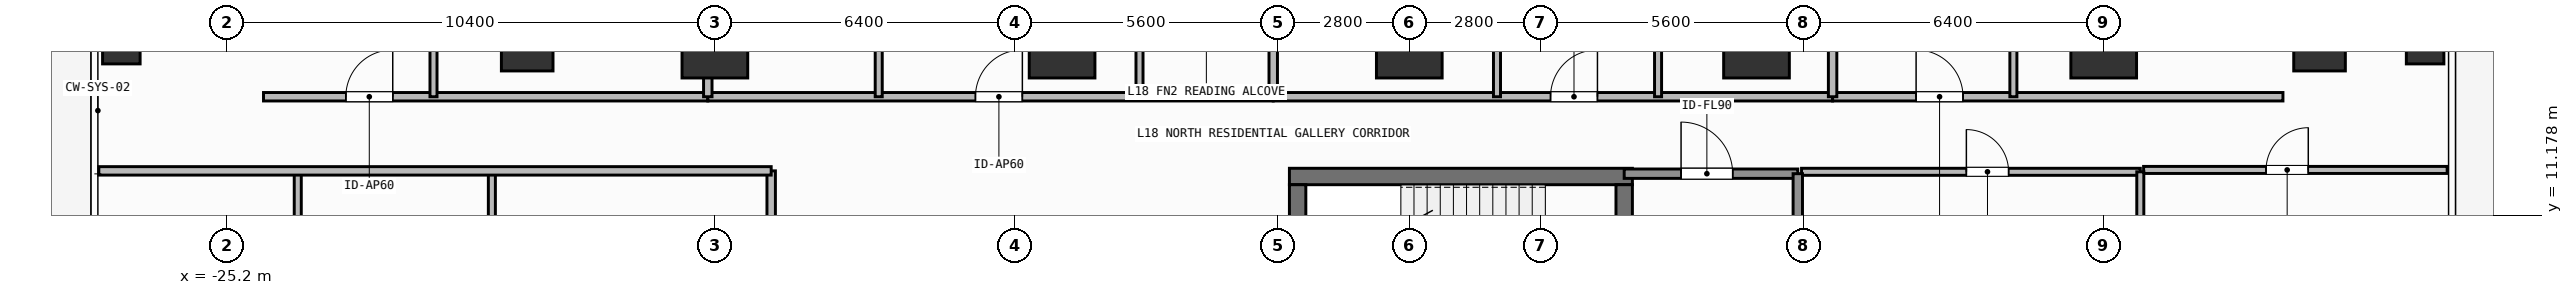
"""IFC4 building model, lengths in metres.
Left out: names, types, materials, properties, quantities, classifications, styles, units other than length and angle.
Written with IfcOpenShell. Run it as: python <this file> out.ifc"""

import sys

from ifc_helpers import new_model, si_unit, direction, frame, frame_2d, origin, origin_2d, place, context, subcontext, project, spatial, rectangle, hollow_rectangle, extrude, element, fill, save


model = new_model("IFC4")
c1 = context("Model", 3, precision=1e-05, world=origin(), true_north=direction((0.0, 1.0)))
c2 = subcontext(c1, "Body", "Model", "MODEL_VIEW")
j1 = project(units=[si_unit("LENGTHUNIT", "METRE"), si_unit("PLANEANGLEUNIT", "RADIAN")], contexts=[c1])
p1 = place(None, origin())
s1 = spatial("IfcSite", under=j1, at=p1, CompositionType="ELEMENT")
p2 = place(p1, origin())
s2 = spatial("IfcBuilding", under=s1, at=p2, CompositionType="ELEMENT")
p3 = place(p2, frame((0.0, 0.0, 69.6)))
s3 = spatial("IfcBuildingStorey", under=s2, at=p3, CompositionType="ELEMENT", Elevation=69.6)
p4 = place(p3, frame((-2.555, 12.0, 0.0), z_axis=(0.0, 0.0, 1.0), x_axis=(1.0, 0.0, 0.0)))
e1 = element("IfcWall", 1, at=p4, inside=s3, PredefinedType="SHEAR", context=c2, shape_type="SweptSolid", body=[
    extrude(rectangle(XDim=7.31, YDim=0.35, at=frame_2d((3.655, 0.0))), origin(), (0.0, 0.0, 1.0), 3.9),
])
p5 = place(p3, frame((-2.38, 8.9, 0.0), z_axis=(0.0, 0.0, 1.0), x_axis=(0.0, 1.0, 0.0)))
e2 = element("IfcWall", 2, at=p5, inside=s3, PredefinedType="SHEAR", context=c2, shape_type="SweptSolid", body=[
    extrude(rectangle(XDim=2.925, YDim=0.35, at=frame_2d((1.462, 0.0))), origin(), (0.0, 0.0, 1.0), 3.9),
])
p6 = place(p3, frame((4.58, 11.825, 0.0), z_axis=(0.0, 0.0, 1.0), x_axis=(0.0, -1.0, 0.0)))
e3 = element("IfcWall", 3, at=p6, inside=s3, PredefinedType="SHEAR", context=c2, shape_type="SweptSolid", body=[
    extrude(rectangle(XDim=2.925, YDim=0.35, at=frame_2d((1.462, 0.0))), origin(), (0.0, 0.0, 1.0), 3.9),
])
p7 = place(p6, frame((0.913, 0.0, 0.0)))
e4 = element("IfcOpeningElement", 4, at=p7, cuts=e3, PredefinedType="OPENING", context=c2, shape_type="SweptSolid", body=[
    extrude(rectangle(XDim=1.1, YDim=2.15, at=frame_2d((0.55, 1.075))), frame((0.0, 0.185, 0.0), z_axis=(0.0, -1.0, 0.0), x_axis=(1.0, 0.0, 0.0)), (0.0, 0.0, 1.0), 0.37),
])
for number, where, z_axis, x_axis in (
    (5, (-14.8, 14.8, 0.0), (0.0, 0.0, 1.0), (1.0, 0.0, 0.0)),
    (6, (-7.4, 14.8, 0.0), (0.0, 0.0, 1.0), (1.0, 0.0, 0.0)),
    (7, (0.0, 14.8, 0.0), (0.0, 0.0, 1.0), (1.0, 0.0, 0.0)),
    (8, (7.4, 14.8, 0.0), (0.0, 0.0, 1.0), (1.0, 0.0, 0.0)),
    (9, (14.8, 14.8, 0.0), (0.0, 0.0, 1.0), (1.0, 0.0, 0.0)),
):
    element("IfcColumn", number, at=place(p3, frame(where, z_axis=z_axis, x_axis=x_axis)), inside=s3, PredefinedType="COLUMN", context=c2, shape_type="SweptSolid", body=[
        extrude(rectangle(XDim=1.4, YDim=1.4, at=origin_2d()), origin(), (0.0, 0.0, 1.0), 3.9),
    ])
for number, where, z_axis, x_axis in (
    (10, (-18.8, 14.8, 0.0), (0.0, 0.0, 1.0), (1.0, 0.0, 0.0)),
    (11, (19.4, 14.8, 0.0), (0.0, 0.0, 1.0), (1.0, 0.0, 0.0)),
):
    element("IfcColumn", number, at=place(p3, frame(where, z_axis=z_axis, x_axis=x_axis)), inside=s3, PredefinedType="COLUMN", context=c2, shape_type="SweptSolid", body=[
        extrude(rectangle(XDim=1.1, YDim=1.1, at=origin_2d()), origin(), (0.0, 0.0, 1.0), 3.9),
    ])
for number, where, z_axis, x_axis in (
    (12, (-27.45, 14.8, 0.0), (0.0, 0.0, 1.0), (1.0, 0.0, 0.0)),
    (13, (21.65, 14.8, 0.0), (0.0, 0.0, 1.0), (1.0, 0.0, 0.0)),
):
    element("IfcColumn", number, at=place(p3, frame(where, z_axis=z_axis, x_axis=x_axis)), inside=s3, PredefinedType="COLUMN", context=c2, shape_type="SweptSolid", body=[
        extrude(hollow_rectangle(XDim=0.8, YDim=0.8, WallThickness=0.036, at=origin_2d()), origin(), (0.0, 0.0, 1.0), 3.9),
    ])
p8 = place(p3, frame((4.58, 12.06, 0.0), z_axis=(0.0, 0.0, 1.0), x_axis=(1.0, 0.0, 0.0)))
e14 = element("IfcWall", 14, at=p8, inside=s3, PredefinedType="SOLIDWALL", context=c2, shape_type="SweptSolid", body=[
    extrude(rectangle(XDim=3.7, YDim=0.2, at=frame_2d((1.85, 0.0))), origin(), (0.0, 0.0, 1.0), 3.68),
])
p9 = place(p8, frame((1.212, 0.0, 0.0)))
e15 = element("IfcOpeningElement", 15, at=p9, cuts=e14, PredefinedType="OPENING", context=c2, shape_type="SweptSolid", body=[
    extrude(rectangle(XDim=1.1, YDim=2.15, at=frame_2d((0.55, 1.075))), frame((0.0, 0.11, 0.0), z_axis=(0.0, -1.0, 0.0), x_axis=(1.0, 0.0, 0.0)), (0.0, 0.0, 1.0), 0.22),
])
p10 = place(p3, frame((8.36, 12.1, 0.0), z_axis=(0.0, 0.0, 1.0), x_axis=(1.0, 0.0, 0.0)))
e16 = element("IfcWall", 16, at=p10, inside=s3, PredefinedType="PARTITIONING", context=c2, shape_type="SweptSolid", body=[
    extrude(rectangle(XDim=7.22, YDim=0.15, at=frame_2d((3.61, 0.0))), origin(), (0.0, 0.0, 1.0), 3.68),
])
p11 = place(p10, frame((3.513, 0.0, 0.0)))
e17 = element("IfcOpeningElement", 17, at=p11, cuts=e16, PredefinedType="OPENING", context=c2, shape_type="SweptSolid", body=[
    extrude(rectangle(XDim=0.9, YDim=2.1, at=frame_2d((0.45, 1.05))), frame((0.0, 0.085, 0.0), z_axis=(0.0, -1.0, 0.0), x_axis=(1.0, 0.0, 0.0)), (0.0, 0.0, 1.0), 0.17),
])
p12 = place(p3, frame((-24.42, 13.7, 0.0), z_axis=(0.0, 0.0, 1.0), x_axis=(1.0, 0.0, 0.0)))
e18 = element("IfcWall", 18, at=p12, inside=s3, PredefinedType="PARTITIONING", context=c2, shape_type="SweptSolid", body=[
    extrude(rectangle(XDim=9.469, YDim=0.18, at=frame_2d((4.734, 0.0))), origin(), (0.0, 0.0, 1.0), 3.68),
])
p13 = place(p12, frame((1.754, 0.0, 0.0)))
e19 = element("IfcOpeningElement", 19, at=p13, cuts=e18, PredefinedType="OPENING", context=c2, shape_type="SweptSolid", body=[
    extrude(rectangle(XDim=1.0, YDim=2.2, at=frame_2d((0.5, 1.1))), frame((0.0, 0.1, 0.0), z_axis=(0.0, -1.0, 0.0), x_axis=(1.0, 0.0, 0.0)), (0.0, 0.0, 1.0), 0.2),
])
p14 = place(p3, frame((-20.797, 13.7, 0.0), z_axis=(0.0, 0.0, 1.0), x_axis=(0.0, 1.0, 0.0)))
e20 = element("IfcWall", 20, at=p14, inside=s3, PredefinedType="PARTITIONING", context=c2, shape_type="SweptSolid", body=[
    extrude(rectangle(XDim=3.899, YDim=0.15, at=frame_2d((1.95, 0.0))), origin(), (0.0, 0.0, 1.0), 3.68),
])
p15 = place(p14, frame((1.524, 0.0, 0.0)))
e21 = element("IfcOpeningElement", 21, at=p15, cuts=e20, PredefinedType="OPENING", context=c2, shape_type="SweptSolid", body=[
    extrude(rectangle(XDim=0.85, YDim=2.1, at=frame_2d((0.425, 1.05))), frame((0.0, 0.085, 0.0), z_axis=(0.0, -1.0, 0.0), x_axis=(1.0, 0.0, 0.0)), (0.0, 0.0, 1.0), 0.17),
])
p16 = place(p3, frame((-14.951, 13.7, 0.0), z_axis=(0.0, 0.0, 1.0), x_axis=(1.0, 0.0, 0.0)))
e22 = element("IfcWall", 22, at=p16, inside=s3, PredefinedType="PARTITIONING", context=c2, shape_type="SweptSolid", body=[
    extrude(rectangle(XDim=12.051, YDim=0.18, at=frame_2d((6.025, 0.0))), origin(), (0.0, 0.0, 1.0), 3.68),
])
p17 = place(p16, frame((5.704, 0.0, 0.0)))
e23 = element("IfcOpeningElement", 23, at=p17, cuts=e22, PredefinedType="OPENING", context=c2, shape_type="SweptSolid", body=[
    extrude(rectangle(XDim=1.0, YDim=2.2, at=frame_2d((0.5, 1.1))), frame((0.0, 0.1, 0.0), z_axis=(0.0, -1.0, 0.0), x_axis=(1.0, 0.0, 0.0)), (0.0, 0.0, 1.0), 0.2),
])
p18 = place(p3, frame((-11.308, 13.7, 0.0), z_axis=(0.0, 0.0, 1.0), x_axis=(0.0, 1.0, 0.0)))
e24 = element("IfcWall", 24, at=p18, inside=s3, PredefinedType="PARTITIONING", context=c2, shape_type="SweptSolid", body=[
    extrude(rectangle(XDim=7.09, YDim=0.15, at=frame_2d((3.545, 0.0))), origin(), (0.0, 0.0, 1.0), 3.37),
])
p19 = place(p18, frame((3.03, 0.0, 0.0)))
e25 = element("IfcOpeningElement", 25, at=p19, cuts=e24, PredefinedType="OPENING", context=c2, shape_type="SweptSolid", body=[
    extrude(rectangle(XDim=0.85, YDim=2.1, at=frame_2d((0.425, 1.05))), frame((0.0, 0.085, 0.0), z_axis=(0.0, -1.0, 0.0), x_axis=(1.0, 0.0, 0.0)), (0.0, 0.0, 1.0), 0.17),
])
p20 = place(p3, frame((-5.75, 13.7, 0.0), z_axis=(0.0, 0.0, 1.0), x_axis=(0.0, 1.0, 0.0)))
e26 = element("IfcWall", 26, at=p20, inside=s3, PredefinedType="PARTITIONING", context=c2, shape_type="SweptSolid", body=[
    extrude(rectangle(XDim=4.02, YDim=0.15, at=frame_2d((2.01, 0.0))), origin(), (0.0, 0.0, 1.0), 3.68),
])
p21 = place(p20, frame((1.941, 0.0, 0.0)))
e27 = element("IfcOpeningElement", 27, at=p21, cuts=e26, PredefinedType="OPENING", context=c2, shape_type="SweptSolid", body=[
    extrude(rectangle(XDim=0.85, YDim=2.1, at=frame_2d((0.425, 1.05))), frame((0.0, 0.085, 0.0), z_axis=(0.0, -1.0, 0.0), x_axis=(1.0, 0.0, 0.0)), (0.0, 0.0, 1.0), 0.17),
])
p22 = place(p3, frame((-2.9, 13.7, 0.0), z_axis=(0.0, 0.0, 1.0), x_axis=(1.0, 0.0, 0.0)))
e28 = element("IfcWall", 28, at=p22, inside=s3, PredefinedType="PARTITIONING", context=c2, shape_type="SweptSolid", body=[
    extrude(rectangle(XDim=11.922, YDim=0.18, at=frame_2d((5.961, 0.0))), origin(), (0.0, 0.0, 1.0), 3.68),
])
p23 = place(p22, frame((5.91, 0.0, 0.0)))
e29 = element("IfcOpeningElement", 29, at=p23, cuts=e28, PredefinedType="OPENING", context=c2, shape_type="SweptSolid", body=[
    extrude(rectangle(XDim=1.0, YDim=2.2, at=frame_2d((0.5, 1.1))), frame((0.0, 0.1, 0.0), z_axis=(0.0, -1.0, 0.0), x_axis=(1.0, 0.0, 0.0)), (0.0, 0.0, 1.0), 0.2),
])
p24 = place(p3, frame((1.869, 13.7, 0.0), z_axis=(0.0, 0.0, 1.0), x_axis=(0.0, 1.0, 0.0)))
e30 = element("IfcWall", 30, at=p24, inside=s3, PredefinedType="PARTITIONING", context=c2, shape_type="SweptSolid", body=[
    extrude(rectangle(XDim=7.09, YDim=0.15, at=frame_2d((3.545, 0.0))), origin(), (0.0, 0.0, 1.0), 3.68),
])
p25 = place(p24, frame((3.03, 0.0, 0.0)))
e31 = element("IfcOpeningElement", 31, at=p25, cuts=e30, PredefinedType="OPENING", context=c2, shape_type="SweptSolid", body=[
    extrude(rectangle(XDim=0.85, YDim=2.1, at=frame_2d((0.425, 1.05))), frame((0.0, 0.085, 0.0), z_axis=(0.0, -1.0, 0.0), x_axis=(1.0, 0.0, 0.0)), (0.0, 0.0, 1.0), 0.17),
])
p26 = place(p3, frame((5.302, 13.7, 0.0), z_axis=(0.0, 0.0, 1.0), x_axis=(0.0, 1.0, 0.0)))
e32 = element("IfcWall", 32, at=p26, inside=s3, PredefinedType="PARTITIONING", context=c2, shape_type="SweptSolid", body=[
    extrude(rectangle(XDim=7.09, YDim=0.15, at=frame_2d((3.545, 0.0))), origin(), (0.0, 0.0, 1.0), 3.68),
])
p27 = place(p26, frame((3.03, 0.0, 0.0)))
e33 = element("IfcOpeningElement", 33, at=p27, cuts=e32, PredefinedType="OPENING", context=c2, shape_type="SweptSolid", body=[
    extrude(rectangle(XDim=0.85, YDim=2.1, at=frame_2d((0.425, 1.05))), frame((0.0, 0.085, 0.0), z_axis=(0.0, -1.0, 0.0), x_axis=(1.0, 0.0, 0.0)), (0.0, 0.0, 1.0), 0.17),
])
p28 = place(p3, frame((9.022, 13.7, 0.0), z_axis=(0.0, 0.0, 1.0), x_axis=(1.0, 0.0, 0.0)))
e34 = element("IfcWall", 34, at=p28, inside=s3, PredefinedType="PARTITIONING", context=c2, shape_type="SweptSolid", body=[
    extrude(rectangle(XDim=9.598, YDim=0.18, at=frame_2d((4.799, 0.0))), origin(), (0.0, 0.0, 1.0), 3.68),
])
p29 = place(p28, frame((1.78, 0.0, 0.0)))
e35 = element("IfcOpeningElement", 35, at=p29, cuts=e34, PredefinedType="OPENING", context=c2, shape_type="SweptSolid", body=[
    extrude(rectangle(XDim=1.0, YDim=2.2, at=frame_2d((0.5, 1.1))), frame((0.0, 0.1, 0.0), z_axis=(0.0, -1.0, 0.0), x_axis=(1.0, 0.0, 0.0)), (0.0, 0.0, 1.0), 0.2),
])
p30 = place(p3, frame((12.875, 13.7, 0.0), z_axis=(0.0, 0.0, 1.0), x_axis=(0.0, 1.0, 0.0)))
e36 = element("IfcWall", 36, at=p30, inside=s3, PredefinedType="PARTITIONING", context=c2, shape_type="SweptSolid", body=[
    extrude(rectangle(XDim=3.899, YDim=0.15, at=frame_2d((1.95, 0.0))), origin(), (0.0, 0.0, 1.0), 3.68),
])
p31 = place(p30, frame((1.865, 0.0, 0.0)))
e37 = element("IfcOpeningElement", 37, at=p31, cuts=e36, PredefinedType="OPENING", context=c2, shape_type="SweptSolid", body=[
    extrude(rectangle(XDim=0.85, YDim=2.1, at=frame_2d((0.425, 1.05))), frame((0.0, 0.085, 0.0), z_axis=(0.0, -1.0, 0.0), x_axis=(1.0, 0.0, 0.0)), (0.0, 0.0, 1.0), 0.17),
])
p32 = place(p3, frame((-13.6, -0.873, 0.0), z_axis=(0.0, 0.0, 1.0), x_axis=(0.0, 1.0, 0.0)))
e38 = element("IfcWall", 38, at=p32, inside=s3, PredefinedType="PARTITIONING", context=c2, shape_type="SweptSolid", body=[
    extrude(rectangle(XDim=12.993, YDim=0.18, at=frame_2d((6.497, 0.0))), origin(), (0.0, 0.0, 1.0), 3.68),
])
p33 = place(p32, frame((6.446, 0.0, 0.0)))
e39 = element("IfcOpeningElement", 39, at=p33, cuts=e38, PredefinedType="OPENING", context=c2, shape_type="SweptSolid", body=[
    extrude(rectangle(XDim=1.0, YDim=2.2, at=frame_2d((0.5, 1.1))), frame((0.0, 0.1, 0.0), z_axis=(0.0, -1.0, 0.0), x_axis=(1.0, 0.0, 0.0)), (0.0, 0.0, 1.0), 0.2),
])
p34 = place(p3, frame((15.65, 12.14, 0.0), z_axis=(0.0, 0.0, 1.0), x_axis=(1.0, 0.0, 0.0)))
e40 = element("IfcWall", 40, at=p34, inside=s3, PredefinedType="PARTITIONING", context=c2, shape_type="SweptSolid", body=[
    extrude(rectangle(XDim=6.47, YDim=0.15, at=frame_2d((3.235, 0.0))), origin(), (0.0, 0.0, 1.0), 3.68),
])
p35 = place(p34, frame((2.61, 0.0, 0.0)))
e41 = element("IfcOpeningElement", 41, at=p35, cuts=e40, PredefinedType="OPENING", context=c2, shape_type="SweptSolid", body=[
    extrude(rectangle(XDim=0.9, YDim=2.1, at=frame_2d((0.45, 1.05))), frame((0.0, 0.085, 0.0), z_axis=(0.0, -1.0, 0.0), x_axis=(1.0, 0.0, 0.0)), (0.0, 0.0, 1.0), 0.17),
])
p36 = place(p3, frame((8.28, 8.95, 0.0), z_axis=(0.0, 0.0, 1.0), x_axis=(0.0, 1.0, 0.0)))
e42 = element("IfcWall", 42, at=p36, inside=s3, PredefinedType="SOLIDWALL", context=c2, shape_type="SweptSolid", body=[
    extrude(rectangle(XDim=3.11, YDim=0.2, at=frame_2d((1.555, 0.0))), origin(), (0.0, 0.0, 1.0), 3.68),
])
p37 = place(p3, frame((15.58, 5.85, 0.0), z_axis=(0.0, 0.0, 1.0), x_axis=(0.0, 1.0, 0.0)))
e43 = element("IfcWall", 43, at=p37, inside=s3, PredefinedType="PARTITIONING", context=c2, shape_type="SweptSolid", body=[
    extrude(rectangle(XDim=6.25, YDim=0.15, at=frame_2d((3.125, 0.0))), origin(), (0.0, 0.0, 1.0), 3.68),
])
p38 = place(p3, frame((-14.951, 13.7, 0.0), z_axis=(0.0, 0.0, 1.0), x_axis=(0.0, 1.0, 0.0)))
e44 = element("IfcWall", 44, at=p38, inside=s3, PredefinedType="PARTITIONING", context=c2, shape_type="SweptSolid", body=[
    extrude(rectangle(XDim=11.33, YDim=0.18, at=frame_2d((5.665, 0.0))), origin(), (0.0, 0.0, 1.0), 3.082),
])
for number, where, z_axis, x_axis in (
    (45, (-2.9, 13.7, 0.0), (0.0, 0.0, 1.0), (0.0, 1.0, 0.0)),
    (46, (9.022, 13.7, 0.0), (0.0, 0.0, 1.0), (0.0, 1.0, 0.0)),
):
    element("IfcWall", number, at=place(p3, frame(where, z_axis=z_axis, x_axis=x_axis)), inside=s3, PredefinedType="PARTITIONING", context=c2, shape_type="SweptSolid", body=[
        extrude(rectangle(XDim=11.33, YDim=0.18, at=frame_2d((5.665, 0.0))), origin(), (0.0, 0.0, 1.0), 3.68),
    ])
for number, where, z_axis, x_axis in (
    (47, (-19.553, 9.32, 0.0), (0.0, 0.0, 1.0), (0.0, 1.0, 0.0)),
    (48, (-23.69, 9.32, 0.0), (0.0, 0.0, 1.0), (0.0, 1.0, 0.0)),
):
    element("IfcWall", number, at=place(p3, frame(where, z_axis=z_axis, x_axis=x_axis)), inside=s3, PredefinedType="PARTITIONING", context=c2, shape_type="SweptSolid", body=[
        extrude(rectangle(XDim=2.8, YDim=0.15, at=frame_2d((1.4, 0.0))), origin(), (0.0, 0.0, 1.0), 3.68),
    ])
p39 = place(p3, frame((-27.93, 12.12, 0.0), z_axis=(0.0, 0.0, 1.0), x_axis=(1.0, 0.0, 0.0)))
e49 = element("IfcWall", 49, at=p39, inside=s3, PredefinedType="PARTITIONING", context=c2, shape_type="SweptSolid", body=[
    extrude(rectangle(XDim=14.33, YDim=0.18, at=frame_2d((7.165, 0.0))), origin(), (0.0, 0.0, 1.0), 3.68),
])
p40 = place(p9, origin())
e50 = element("IfcDoor", 50, at=p40, inside=s3, OperationType="SINGLE_SWING_LEFT", PredefinedType="DOOR", context=c2, shape_type="SweptSolid", body=[
    extrude(rectangle(XDim=1.1, YDim=2.15, at=frame_2d((0.55, 1.075))), frame((0.0, 0.025, 0.0), z_axis=(0.0, -1.0, 0.0), x_axis=(1.0, 0.0, 0.0)), (0.0, 0.0, 1.0), 0.05),
])
fill(e15, e50)
p41 = place(p11, origin())
e51 = element("IfcDoor", 51, at=p41, inside=s3, OperationType="SINGLE_SWING_LEFT", PredefinedType="DOOR", context=c2, shape_type="SweptSolid", body=[
    extrude(rectangle(XDim=0.9, YDim=2.1, at=frame_2d((0.45, 1.05))), frame((0.0, 0.025, 0.0), z_axis=(0.0, -1.0, 0.0), x_axis=(1.0, 0.0, 0.0)), (0.0, 0.0, 1.0), 0.05),
])
fill(e17, e51)
p42 = place(p13, origin())
e52 = element("IfcDoor", 52, at=p42, inside=s3, OperationType="SINGLE_SWING_RIGHT", PredefinedType="DOOR", context=c2, shape_type="SweptSolid", body=[
    extrude(rectangle(XDim=1.0, YDim=2.2, at=frame_2d((0.5, 1.1))), frame((0.0, 0.025, 0.0), z_axis=(0.0, -1.0, 0.0), x_axis=(1.0, 0.0, 0.0)), (0.0, 0.0, 1.0), 0.05),
])
fill(e19, e52)
p43 = place(p17, origin())
e53 = element("IfcDoor", 53, at=p43, inside=s3, OperationType="SINGLE_SWING_RIGHT", PredefinedType="DOOR", context=c2, shape_type="SweptSolid", body=[
    extrude(rectangle(XDim=1.0, YDim=2.2, at=frame_2d((0.5, 1.1))), frame((0.0, 0.025, 0.0), z_axis=(0.0, -1.0, 0.0), x_axis=(1.0, 0.0, 0.0)), (0.0, 0.0, 1.0), 0.05),
])
fill(e23, e53)
p44 = place(p23, origin())
e54 = element("IfcDoor", 54, at=p44, inside=s3, OperationType="SINGLE_SWING_RIGHT", PredefinedType="DOOR", context=c2, shape_type="SweptSolid", body=[
    extrude(rectangle(XDim=1.0, YDim=2.2, at=frame_2d((0.5, 1.1))), frame((0.0, 0.025, 0.0), z_axis=(0.0, -1.0, 0.0), x_axis=(1.0, 0.0, 0.0)), (0.0, 0.0, 1.0), 0.05),
])
fill(e29, e54)
p45 = place(p29, origin())
e55 = element("IfcDoor", 55, at=p45, inside=s3, OperationType="SINGLE_SWING_LEFT", PredefinedType="DOOR", context=c2, shape_type="SweptSolid", body=[
    extrude(rectangle(XDim=1.0, YDim=2.2, at=frame_2d((0.5, 1.1))), frame((0.0, 0.025, 0.0), z_axis=(0.0, -1.0, 0.0), x_axis=(1.0, 0.0, 0.0)), (0.0, 0.0, 1.0), 0.05),
])
fill(e35, e55)
p46 = place(p35, origin())
e56 = element("IfcDoor", 56, at=p46, inside=s3, OperationType="SINGLE_SWING_RIGHT", PredefinedType="DOOR", context=c2, shape_type="SweptSolid", body=[
    extrude(rectangle(XDim=0.9, YDim=2.1, at=frame_2d((0.45, 1.05))), frame((0.0, 0.025, 0.0), z_axis=(0.0, -1.0, 0.0), x_axis=(1.0, 0.0, 0.0)), (0.0, 0.0, 1.0), 0.05),
])
fill(e41, e56)
save(model, sys.argv[1])
